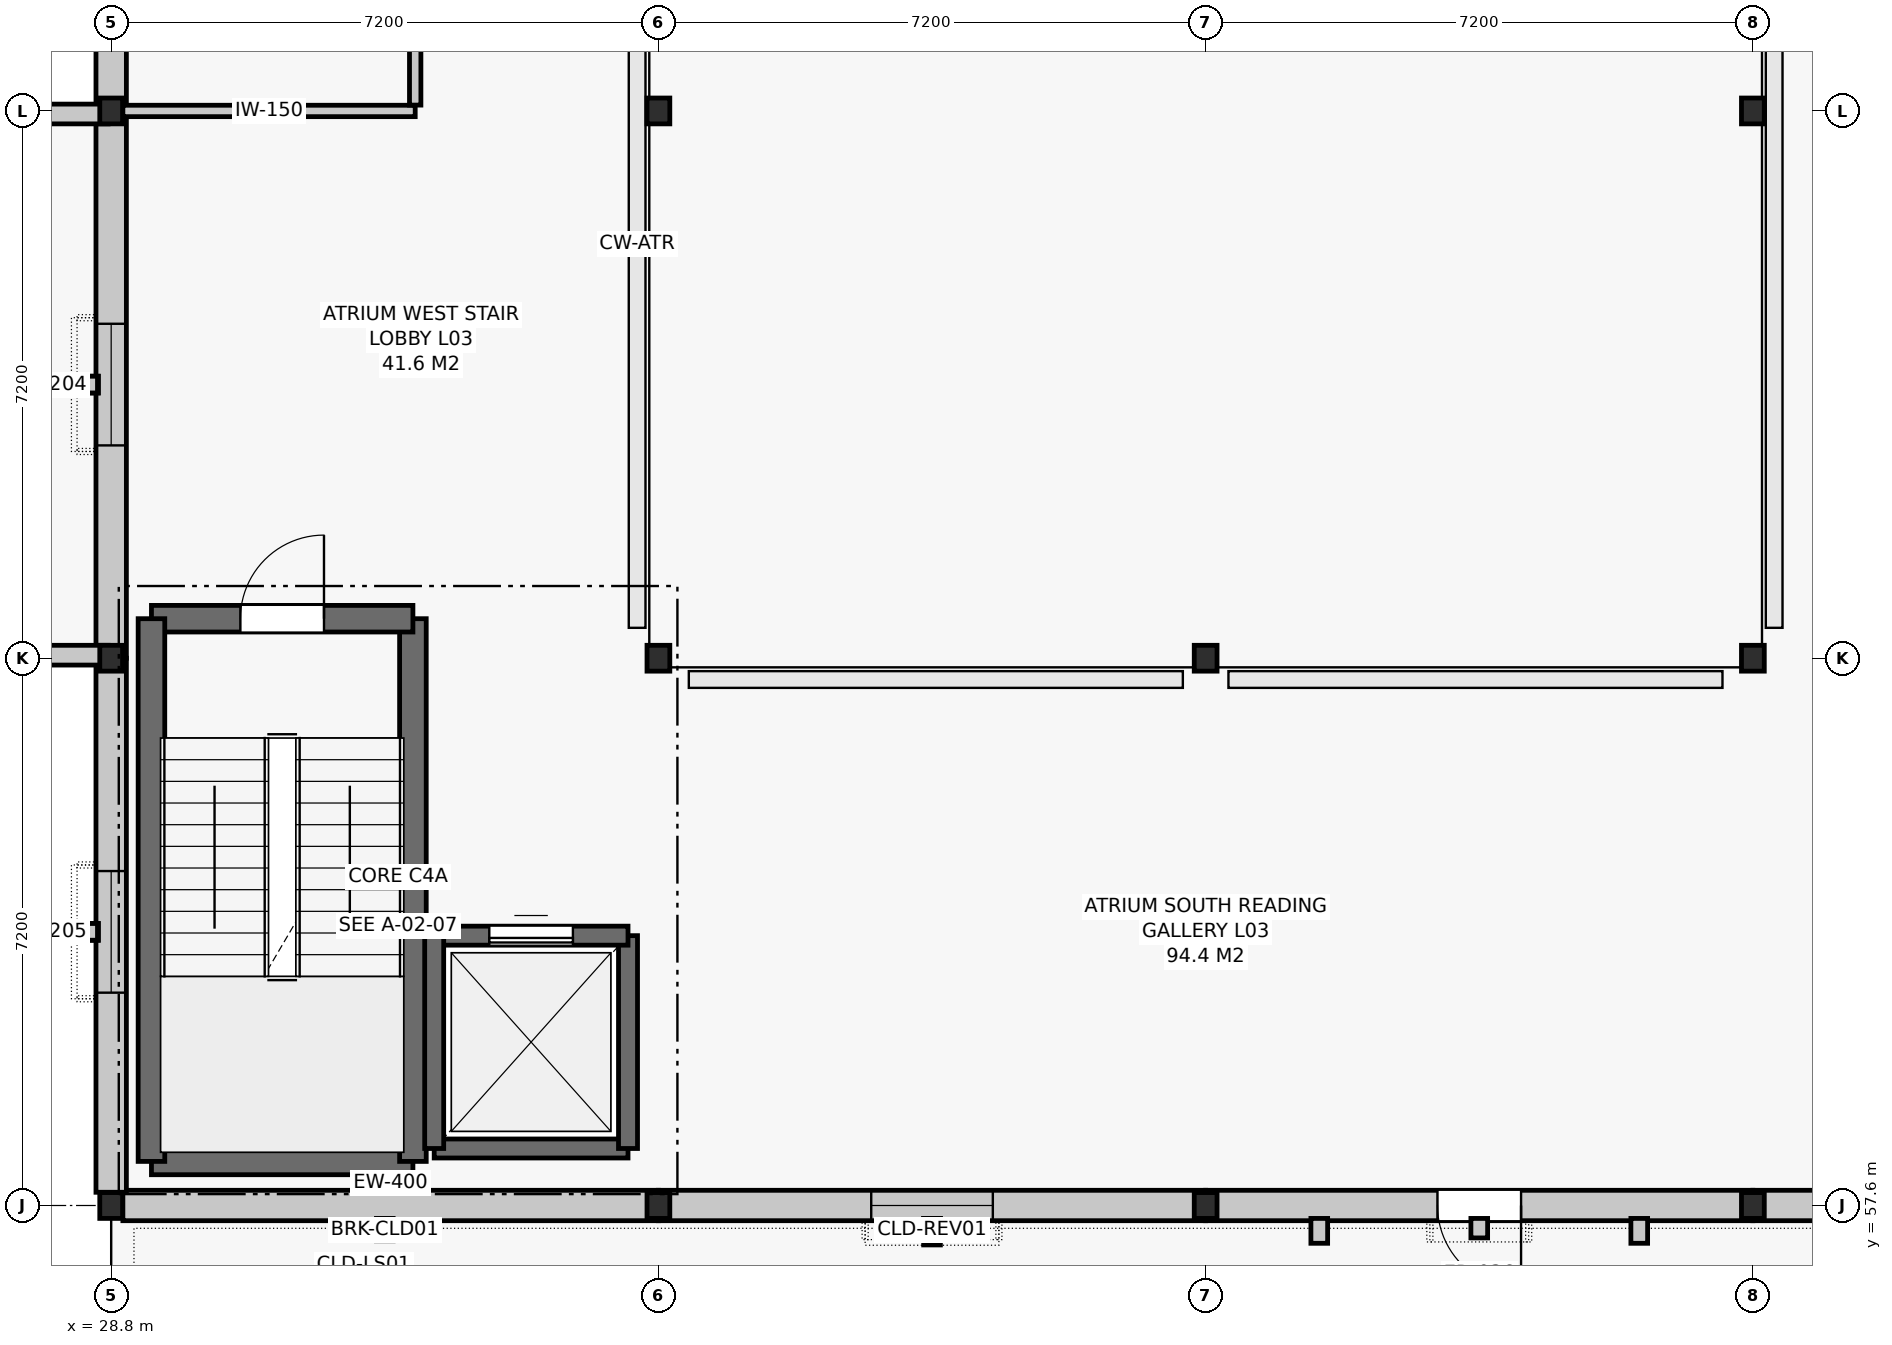
"""IFC4 building model, lengths in metres.
Left out: names, types, materials, properties, quantities, classifications, styles, units other than length and angle.
Written with IfcOpenShell. Run it as: python <this file> out.ifc"""

import sys

from ifc_helpers import new_model, si_unit, direction, frame, frame_2d, origin, origin_2d, place, context, subcontext, project, spatial, rectangle, i_section, extrude, element, fill, save


model = new_model("IFC4")
c1 = context("Model", 3, precision=1e-05, world=origin(), true_north=direction((0.0, 1.0)))
c2 = subcontext(c1, "Body", "Model", "MODEL_VIEW")
j1 = project(units=[si_unit("LENGTHUNIT", "METRE"), si_unit("PLANEANGLEUNIT", "RADIAN")], contexts=[c1])
p1 = place(None, origin())
s1 = spatial("IfcSite", under=j1, at=p1, CompositionType="ELEMENT")
p2 = place(p1, origin())
s2 = spatial("IfcBuilding", under=s1, at=p2, CompositionType="ELEMENT")
p3 = place(p2, frame((0.0, 0.0, 14.4)))
s3 = spatial("IfcBuildingStorey", under=s2, at=p3, CompositionType="ELEMENT", Elevation=14.4)
for number, where, z_axis, x_axis in (
    (1, (28.8, 57.6, 0.0), (0.0, 0.0, 1.0), (1.0, 0.0, 0.0)),
    (2, (28.8, 64.8, 0.0), (0.0, 0.0, 1.0), (1.0, 0.0, 0.0)),
    (3, (28.8, 72.0, 0.0), (0.0, 0.0, 1.0), (1.0, 0.0, 0.0)),
    (4, (36.0, 57.6, 0.0), (0.0, 0.0, 1.0), (1.0, 0.0, 0.0)),
    (5, (36.0, 64.8, 0.0), (0.0, 0.0, 1.0), (1.0, 0.0, 0.0)),
    (6, (36.0, 72.0, 0.0), (0.0, 0.0, 1.0), (1.0, 0.0, 0.0)),
    (7, (43.2, 57.6, 0.0), (0.0, 0.0, 1.0), (1.0, 0.0, 0.0)),
    (8, (43.2, 64.8, 0.0), (0.0, 0.0, 1.0), (1.0, 0.0, 0.0)),
    (9, (50.4, 57.6, 0.0), (0.0, 0.0, 1.0), (1.0, 0.0, 0.0)),
    (10, (50.4, 64.8, 0.0), (0.0, 0.0, 1.0), (1.0, 0.0, 0.0)),
    (11, (50.4, 72.0, 0.0), (0.0, 0.0, 1.0), (1.0, 0.0, 0.0)),
):
    element("IfcColumn", number, at=place(p3, frame(where, z_axis=z_axis, x_axis=x_axis)), inside=s3, PredefinedType="COLUMN", context=c2, shape_type="SweptSolid", body=[
        extrude(i_section(OverallWidth=0.3, OverallDepth=0.34, WebThickness=0.012, FlangeThickness=0.021, FilletRadius=0.027, at=origin_2d()), origin(), (0.0, 0.0, 1.0), 4.2),
    ])
p4 = place(p3, frame((28.954, 57.6, 0.0), z_axis=(0.0, 0.0, 1.0), x_axis=(1.0, 0.0, 0.0)))
e12 = element("IfcWall", 12, at=p4, inside=s3, PredefinedType="SOLIDWALL", context=c2, shape_type="SweptSolid", body=[
    extrude(rectangle(XDim=7.046, YDim=0.4, at=frame_2d((3.523, 0.0))), origin(), (0.0, 0.0, 1.0), 3.22),
])
p5 = place(p3, frame((36.0, 57.6, 0.0), z_axis=(0.0, 0.0, 1.0), x_axis=(1.0, 0.0, 0.0)))
e13 = element("IfcWall", 13, at=p5, inside=s3, PredefinedType="SOLIDWALL", context=c2, shape_type="SweptSolid", body=[
    extrude(rectangle(XDim=7.2, YDim=0.4, at=frame_2d((3.6, 0.0))), origin(), (0.0, 0.0, 1.0), 3.22),
])
p6 = place(p5, frame((2.8, 0.0, 0.95)))
e14 = element("IfcOpeningElement", 14, at=p6, cuts=e13, PredefinedType="OPENING", context=c2, shape_type="SweptSolid", body=[
    extrude(rectangle(XDim=1.6, YDim=2.2, at=frame_2d((0.8, 1.1))), frame((0.0, 0.212, 0.0), z_axis=(0.0, -1.0, 0.0), x_axis=(1.0, 0.0, 0.0)), (0.0, 0.0, 1.0), 0.424),
])
p7 = place(p3, frame((43.2, 57.6, 0.0), z_axis=(0.0, 0.0, 1.0), x_axis=(1.0, 0.0, 0.0)))
e15 = element("IfcWall", 15, at=p7, inside=s3, PredefinedType="SOLIDWALL", context=c2, shape_type="SweptSolid", body=[
    extrude(rectangle(XDim=7.2, YDim=0.4, at=frame_2d((3.6, 0.0))), origin(), (0.0, 0.0, 1.0), 3.22),
])
p8 = place(p7, frame((3.05, 0.0, 0.0)))
e16 = element("IfcOpeningElement", 16, at=p8, cuts=e15, PredefinedType="OPENING", context=c2, shape_type="SweptSolid", body=[
    extrude(rectangle(XDim=1.1, YDim=2.2, at=frame_2d((0.55, 1.1))), frame((0.0, 0.212, 0.0), z_axis=(0.0, -1.0, 0.0), x_axis=(1.0, 0.0, 0.0)), (0.0, 0.0, 1.0), 0.424),
])
p9 = place(p3, frame((50.4, 57.6, 0.0), z_axis=(0.0, 0.0, 1.0), x_axis=(1.0, 0.0, 0.0)))
e17 = element("IfcWall", 17, at=p9, inside=s3, PredefinedType="SOLIDWALL", context=c2, shape_type="SweptSolid", body=[
    extrude(rectangle(XDim=7.046, YDim=0.4, at=frame_2d((3.523, 0.0))), origin(), (0.0, 0.0, 1.0), 3.22),
])
p10 = place(p9, frame((2.8, 0.0, 0.95)))
e18 = element("IfcOpeningElement", 18, at=p10, cuts=e17, PredefinedType="OPENING", context=c2, shape_type="SweptSolid", body=[
    extrude(rectangle(XDim=1.6, YDim=2.2, at=frame_2d((0.8, 1.1))), frame((0.0, 0.212, 0.0), z_axis=(0.0, -1.0, 0.0), x_axis=(1.0, 0.0, 0.0)), (0.0, 0.0, 1.0), 0.424),
])
p11 = place(p3, frame((28.8, 79.2, 0.0), z_axis=(0.0, 0.0, 1.0), x_axis=(0.0, -1.0, 0.0)))
e19 = element("IfcWall", 19, at=p11, inside=s3, PredefinedType="SOLIDWALL", context=c2, shape_type="SweptSolid", body=[
    extrude(rectangle(XDim=7.2, YDim=0.4, at=frame_2d((3.6, 0.0))), origin(), (0.0, 0.0, 1.0), 3.22),
])
p12 = place(p11, frame((2.8, 0.0, 0.95)))
e20 = element("IfcOpeningElement", 20, at=p12, cuts=e19, PredefinedType="OPENING", context=c2, shape_type="SweptSolid", body=[
    extrude(rectangle(XDim=1.6, YDim=2.2, at=frame_2d((0.8, 1.1))), frame((0.0, 0.212, 0.0), z_axis=(0.0, -1.0, 0.0), x_axis=(1.0, 0.0, 0.0)), (0.0, 0.0, 1.0), 0.424),
])
p13 = place(p3, frame((28.8, 72.0, 0.0), z_axis=(0.0, 0.0, 1.0), x_axis=(0.0, -1.0, 0.0)))
e21 = element("IfcWall", 21, at=p13, inside=s3, PredefinedType="SOLIDWALL", context=c2, shape_type="SweptSolid", body=[
    extrude(rectangle(XDim=7.2, YDim=0.4, at=frame_2d((3.6, 0.0))), origin(), (0.0, 0.0, 1.0), 3.22),
])
p14 = place(p13, frame((2.8, 0.0, 0.95)))
e22 = element("IfcOpeningElement", 22, at=p14, cuts=e21, PredefinedType="OPENING", context=c2, shape_type="SweptSolid", body=[
    extrude(rectangle(XDim=1.6, YDim=2.2, at=frame_2d((0.8, 1.1))), frame((0.0, 0.212, 0.0), z_axis=(0.0, -1.0, 0.0), x_axis=(1.0, 0.0, 0.0)), (0.0, 0.0, 1.0), 0.424),
])
p15 = place(p3, frame((28.8, 64.8, 0.0), z_axis=(0.0, 0.0, 1.0), x_axis=(0.0, -1.0, 0.0)))
e23 = element("IfcWall", 23, at=p15, inside=s3, PredefinedType="SOLIDWALL", context=c2, shape_type="SweptSolid", body=[
    extrude(rectangle(XDim=7.026, YDim=0.4, at=frame_2d((3.513, 0.0))), origin(), (0.0, 0.0, 1.0), 3.22),
])
p16 = place(p15, frame((2.8, 0.0, 0.95)))
e24 = element("IfcOpeningElement", 24, at=p16, cuts=e23, PredefinedType="OPENING", context=c2, shape_type="SweptSolid", body=[
    extrude(rectangle(XDim=1.6, YDim=2.2, at=frame_2d((0.8, 1.1))), frame((0.0, 0.212, 0.0), z_axis=(0.0, -1.0, 0.0), x_axis=(1.0, 0.0, 0.0)), (0.0, 0.0, 1.0), 0.424),
])
for number, where, z_axis, x_axis in (
    (25, (21.64, 64.84, 0.0), (0.0, 0.0, 1.0), (1.0, 0.0, 0.0)),
    (26, (28.76, 71.96, 0.0), (0.0, 0.0, 1.0), (-1.0, 0.0, 0.0)),
):
    element("IfcWall", number, at=place(p3, frame(where, z_axis=z_axis, x_axis=x_axis)), inside=s3, PredefinedType="PARAPET", context=c2, shape_type="SweptSolid", body=[
        extrude(rectangle(XDim=7.12, YDim=0.26, at=frame_2d((3.56, 0.0))), origin(), (0.0, 0.0, 1.0), 0.9),
    ])
p17 = place(p3, frame((29.33, 58.18, 0.0), z_axis=(0.0, 0.0, 1.0), x_axis=(1.0, 0.0, 0.0)))
e27 = element("IfcWall", 27, at=p17, inside=s3, PredefinedType="SHEAR", context=c2, shape_type="SweptSolid", body=[
    extrude(rectangle(XDim=3.44, YDim=0.35, at=frame_2d((1.72, 0.0))), origin(), (0.0, 0.0, 1.0), 3.94),
])
p18 = place(p3, frame((32.77, 58.18, 0.0), z_axis=(0.0, 0.0, 1.0), x_axis=(0.0, 1.0, 0.0)))
e28 = element("IfcWall", 28, at=p18, inside=s3, PredefinedType="SHEAR", context=c2, shape_type="SweptSolid", body=[
    extrude(rectangle(XDim=7.14, YDim=0.35, at=frame_2d((3.57, 0.0))), origin(), (0.0, 0.0, 1.0), 3.94),
])
p19 = place(p3, frame((32.77, 65.32, 0.0), z_axis=(0.0, 0.0, 1.0), x_axis=(-1.0, 0.0, 0.0)))
e29 = element("IfcWall", 29, at=p19, inside=s3, PredefinedType="SHEAR", context=c2, shape_type="SweptSolid", body=[
    extrude(rectangle(XDim=3.44, YDim=0.35, at=frame_2d((1.72, 0.0))), origin(), (0.0, 0.0, 1.0), 3.94),
])
p20 = place(p19, frame((1.17, 0.0, 0.0)))
e30 = element("IfcOpeningElement", 30, at=p20, cuts=e29, PredefinedType="OPENING", context=c2, shape_type="SweptSolid", body=[
    extrude(rectangle(XDim=1.1, YDim=2.15, at=frame_2d((0.55, 1.075))), frame((0.0, 0.187, 0.0), z_axis=(0.0, -1.0, 0.0), x_axis=(1.0, 0.0, 0.0)), (0.0, 0.0, 1.0), 0.374),
])
p21 = place(p3, frame((29.33, 65.32, 0.0), z_axis=(0.0, 0.0, 1.0), x_axis=(0.0, -1.0, 0.0)))
e31 = element("IfcWall", 31, at=p21, inside=s3, PredefinedType="SHEAR", context=c2, shape_type="SweptSolid", body=[
    extrude(rectangle(XDim=7.14, YDim=0.35, at=frame_2d((3.57, 0.0))), origin(), (0.0, 0.0, 1.0), 3.94),
])
p22 = place(p3, frame((33.05, 58.35, 0.0), z_axis=(0.0, 0.0, 1.0), x_axis=(1.0, 0.0, 0.0)))
e32 = element("IfcWall", 32, at=p22, inside=s3, PredefinedType="SHEAR", context=c2, shape_type="SweptSolid", body=[
    extrude(rectangle(XDim=2.55, YDim=0.25, at=frame_2d((1.275, 0.0))), origin(), (0.0, 0.0, 1.0), 3.94),
])
p23 = place(p3, frame((35.6, 58.35, 0.0), z_axis=(0.0, 0.0, 1.0), x_axis=(0.0, 1.0, 0.0)))
e33 = element("IfcWall", 33, at=p23, inside=s3, PredefinedType="SHEAR", context=c2, shape_type="SweptSolid", body=[
    extrude(rectangle(XDim=2.8, YDim=0.25, at=frame_2d((1.4, 0.0))), origin(), (0.0, 0.0, 1.0), 3.94),
])
p24 = place(p3, frame((35.6, 61.15, 0.0), z_axis=(0.0, 0.0, 1.0), x_axis=(-1.0, 0.0, 0.0)))
e34 = element("IfcWall", 34, at=p24, inside=s3, PredefinedType="SHEAR", context=c2, shape_type="SweptSolid", body=[
    extrude(rectangle(XDim=2.55, YDim=0.25, at=frame_2d((1.275, 0.0))), origin(), (0.0, 0.0, 1.0), 3.94),
])
p25 = place(p24, frame((0.725, 0.0, 0.0)))
e35 = element("IfcOpeningElement", 35, at=p25, cuts=e34, PredefinedType="OPENING", context=c2, shape_type="SweptSolid", body=[
    extrude(rectangle(XDim=1.1, YDim=2.1, at=frame_2d((0.55, 1.05))), frame((0.0, 0.137, 0.0), z_axis=(0.0, -1.0, 0.0), x_axis=(1.0, 0.0, 0.0)), (0.0, 0.0, 1.0), 0.274),
])
p26 = place(p3, frame((33.05, 61.15, 0.0), z_axis=(0.0, 0.0, 1.0), x_axis=(0.0, -1.0, 0.0)))
e36 = element("IfcWall", 36, at=p26, inside=s3, PredefinedType="SHEAR", context=c2, shape_type="SweptSolid", body=[
    extrude(rectangle(XDim=2.8, YDim=0.25, at=frame_2d((1.4, 0.0))), origin(), (0.0, 0.0, 1.0), 3.94),
])
p27 = place(p3, frame((28.954, 72.0, 0.0), z_axis=(0.0, 0.0, 1.0), x_axis=(1.0, 0.0, 0.0)))
e37 = element("IfcWall", 37, at=p27, inside=s3, PredefinedType="PARTITIONING", context=c2, shape_type="SweptSolid", body=[
    extrude(rectangle(XDim=3.846, YDim=0.15, at=frame_2d((1.923, 0.0))), origin(), (0.0, 0.0, 1.0), 3.615),
])
p28 = place(p3, frame((32.8, 72.077, 0.0), z_axis=(0.0, 0.0, 1.0), x_axis=(0.0, 1.0, 0.0)))
e38 = element("IfcWall", 38, at=p28, inside=s3, PredefinedType="PARTITIONING", context=c2, shape_type="SweptSolid", body=[
    extrude(rectangle(XDim=6.046, YDim=0.15, at=frame_2d((3.023, 0.0))), origin(), (0.0, 0.0, 1.0), 3.615),
])
p29 = place(p28, frame((2.533, 0.0, 0.0)))
e39 = element("IfcOpeningElement", 39, at=p29, cuts=e38, PredefinedType="OPENING", context=c2, shape_type="SweptSolid", body=[
    extrude(rectangle(XDim=0.98, YDim=2.1, at=frame_2d((0.49, 1.05))), frame((0.0, 0.087, 0.0), z_axis=(0.0, -1.0, 0.0), x_axis=(1.0, 0.0, 0.0)), (0.0, 0.0, 1.0), 0.174),
])
p30 = place(p6, origin())
e40 = element("IfcWindow", 40, at=p30, inside=s3, PartitioningType="SINGLE_PANEL", PredefinedType="WINDOW", context=c2, shape_type="SweptSolid", body=[
    extrude(rectangle(XDim=1.6, YDim=2.2, at=frame_2d((0.8, 1.1))), frame((0.0, 0.03, 0.0), z_axis=(0.0, -1.0, 0.0), x_axis=(1.0, 0.0, 0.0)), (0.0, 0.0, 1.0), 0.06),
])
fill(e14, e40)
p31 = place(p8, frame((1.1, 0.0, 0.0), z_axis=(0.0, 0.0, 1.0), x_axis=(-1.0, 0.0, 0.0)))
e41 = element("IfcDoor", 41, at=p31, inside=s3, OperationType="SINGLE_SWING_LEFT", PredefinedType="DOOR", context=c2, shape_type="SweptSolid", body=[
    extrude(rectangle(XDim=1.1, YDim=2.2, at=frame_2d((0.55, 1.1))), frame((0.0, 0.025, 0.0), z_axis=(0.0, -1.0, 0.0), x_axis=(1.0, 0.0, 0.0)), (0.0, 0.0, 1.0), 0.05),
])
fill(e16, e41)
p32 = place(p14, origin())
e42 = element("IfcWindow", 42, at=p32, inside=s3, PartitioningType="SINGLE_PANEL", PredefinedType="WINDOW", context=c2, shape_type="SweptSolid", body=[
    extrude(rectangle(XDim=1.6, YDim=2.2, at=frame_2d((0.8, 1.1))), frame((0.0, 0.03, 0.0), z_axis=(0.0, -1.0, 0.0), x_axis=(1.0, 0.0, 0.0)), (0.0, 0.0, 1.0), 0.06),
])
fill(e22, e42)
p33 = place(p16, origin())
e43 = element("IfcWindow", 43, at=p33, inside=s3, PartitioningType="SINGLE_PANEL", PredefinedType="WINDOW", context=c2, shape_type="SweptSolid", body=[
    extrude(rectangle(XDim=1.6, YDim=2.2, at=frame_2d((0.8, 1.1))), frame((0.0, 0.03, 0.0), z_axis=(0.0, -1.0, 0.0), x_axis=(1.0, 0.0, 0.0)), (0.0, 0.0, 1.0), 0.06),
])
fill(e24, e43)
p34 = place(p20, frame((1.1, 0.0, 0.0), z_axis=(0.0, 0.0, 1.0), x_axis=(-1.0, 0.0, 0.0)))
e44 = element("IfcDoor", 44, at=p34, inside=s3, OperationType="SINGLE_SWING_RIGHT", PredefinedType="DOOR", context=c2, shape_type="SweptSolid", body=[
    extrude(rectangle(XDim=1.1, YDim=2.15, at=frame_2d((0.55, 1.075))), frame((0.0, 0.025, 0.0), z_axis=(0.0, -1.0, 0.0), x_axis=(1.0, 0.0, 0.0)), (0.0, 0.0, 1.0), 0.05),
])
fill(e30, e44)
p35 = place(p25, origin())
e45 = element("IfcDoor", 45, at=p35, inside=s3, OperationType="SLIDING_TO_LEFT", PredefinedType="DOOR", context=c2, shape_type="SweptSolid", body=[
    extrude(rectangle(XDim=1.1, YDim=2.1, at=frame_2d((0.55, 1.05))), frame((0.0, 0.025, 0.0), z_axis=(0.0, -1.0, 0.0), x_axis=(1.0, 0.0, 0.0)), (0.0, 0.0, 1.0), 0.05),
])
fill(e35, e45)
save(model, sys.argv[1])
